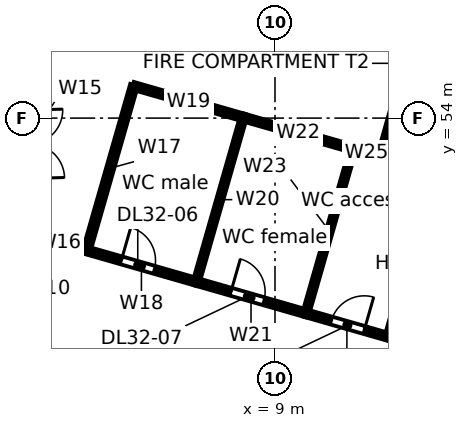
"""IFC4 building model, lengths in metres.
Left out: names, types, materials, properties, quantities, classifications, styles, units other than length and angle.
Written with IfcOpenShell. Run it as: python <this file> out.ifc"""

import sys

from ifc_helpers import new_model, si_unit, direction, frame, frame_2d, origin, place, context, subcontext, project, spatial, rectangle, extrude, element, fill, save


model = new_model("IFC4")
c1 = context("Model", 3, precision=1e-05, world=origin(), true_north=direction((0.0, 1.0)))
c2 = subcontext(c1, "Body", "Model", "MODEL_VIEW")
j1 = project(units=[si_unit("LENGTHUNIT", "METRE"), si_unit("PLANEANGLEUNIT", "RADIAN")], contexts=[c1])
p1 = place(None, origin())
s1 = spatial("IfcSite", under=j1, at=p1, CompositionType="ELEMENT")
p2 = place(p1, origin())
s2 = spatial("IfcBuilding", under=s1, at=p2, CompositionType="ELEMENT")
p3 = place(p2, frame((0.0, 0.0, 154.9)))
s3 = spatial("IfcBuildingStorey", under=s2, at=p3, CompositionType="ELEMENT", Elevation=154.9)
p4 = place(p3, frame((24.042, 41.106, 0.0), z_axis=(0.0, 0.0, 1.0), x_axis=(-0.961261693976, 0.275637362661, 0.0)))
e1 = element("IfcWall", 1, at=p4, inside=s3, PredefinedType="STANDARD", context=c2, shape_type="SweptSolid", body=[
    extrude(rectangle(XDim=24.948, YDim=0.3, at=frame_2d((12.474, 0.0))), origin(), (0.0, 0.0, 1.0), 3.68),
])
p5 = place(p4, frame((21.441, 0.0, 0.6)))
e2 = element("IfcOpeningElement", 2, at=p5, cuts=e1, PredefinedType="OPENING", context=c2, shape_type="SweptSolid", body=[
    extrude(rectangle(XDim=0.9, YDim=2.4, at=frame_2d((0.45, 1.2))), frame((0.0, 0.16, 0.0), z_axis=(0.0, -1.0, 0.0), x_axis=(1.0, 0.0, 0.0)), (0.0, 0.0, 1.0), 0.32),
])
p6 = place(p4, frame((13.121, 0.0, 0.6)))
e3 = element("IfcOpeningElement", 3, at=p6, cuts=e1, PredefinedType="OPENING", context=c2, shape_type="SweptSolid", body=[
    extrude(rectangle(XDim=0.9, YDim=2.4, at=frame_2d((0.45, 1.2))), frame((0.0, 0.16, 0.0), z_axis=(0.0, -1.0, 0.0), x_axis=(1.0, 0.0, 0.0)), (0.0, 0.0, 1.0), 0.32),
])
p7 = place(p4, frame((10.591, 0.0, 0.0)))
e4 = element("IfcOpeningElement", 4, at=p7, cuts=e1, PredefinedType="OPENING", context=c2, shape_type="SweptSolid", body=[
    extrude(rectangle(XDim=1.8, YDim=2.4, at=frame_2d((0.9, 1.2))), frame((0.0, 0.16, 0.0), z_axis=(0.0, -1.0, 0.0), x_axis=(1.0, 0.0, 0.0)), (0.0, 0.0, 1.0), 0.32),
])
p8 = place(p4, frame((4.8, 0.0, 0.6)))
e5 = element("IfcOpeningElement", 5, at=p8, cuts=e1, PredefinedType="OPENING", context=c2, shape_type="SweptSolid", body=[
    extrude(rectangle(XDim=0.9, YDim=2.4, at=frame_2d((0.45, 1.2))), frame((0.0, 0.16, 0.0), z_axis=(0.0, -1.0, 0.0), x_axis=(1.0, 0.0, 0.0)), (0.0, 0.0, 1.0), 0.32),
])
p9 = place(p4, frame((2.27, 0.0, 0.0)))
e6 = element("IfcOpeningElement", 6, at=p9, cuts=e1, PredefinedType="OPENING", context=c2, shape_type="SweptSolid", body=[
    extrude(rectangle(XDim=1.8, YDim=2.4, at=frame_2d((0.9, 1.2))), frame((0.0, 0.16, 0.0), z_axis=(0.0, -1.0, 0.0), x_axis=(1.0, 0.0, 0.0)), (0.0, 0.0, 1.0), 0.32),
])
p10 = place(p3, frame((2.601, 50.932, 0.0), z_axis=(0.0, 0.0, 1.0), x_axis=(0.961197773994, -0.27586018065, 0.0)))
e7 = element("IfcWall", 7, at=p10, inside=s3, PredefinedType="PARTITIONING", context=c2, shape_type="SweptSolid", body=[
    extrude(rectangle(XDim=1.5, YDim=0.125, at=frame_2d((0.75, 0.0))), origin(), (0.0, 0.0, 1.0), 3.68),
])
p11 = place(p3, frame((4.043, 50.518, 0.0), z_axis=(0.0, 0.0, 1.0), x_axis=(0.275745553681, 0.96123066411, 0.0)))
e8 = element("IfcWall", 8, at=p11, inside=s3, PredefinedType="PARTITIONING", context=c2, shape_type="SweptSolid", body=[
    extrude(rectangle(XDim=4.5, YDim=0.15, at=frame_2d((2.25, 0.0))), origin(), (0.0, 0.0, 1.0), 3.68),
])
p12 = place(p3, frame((4.043, 50.518, 0.0), z_axis=(0.0, 0.0, 1.0), x_axis=(0.961247103494, -0.275688240636, 0.0)))
e9 = element("IfcWall", 9, at=p12, inside=s3, PredefinedType="PARTITIONING", context=c2, shape_type="SweptSolid", body=[
    extrude(rectangle(XDim=3.0, YDim=0.15, at=frame_2d((1.5, 0.0))), origin(), (0.0, 0.0, 1.0), 3.68),
])
p13 = place(p12, frame((0.95, 0.0, 0.0)))
e10 = element("IfcOpeningElement", 10, at=p13, cuts=e9, PredefinedType="OPENING", context=c2, shape_type="SweptSolid", body=[
    extrude(rectangle(XDim=0.9, YDim=2.1, at=frame_2d((0.45, 1.05))), frame((0.0, 0.085, 0.0), z_axis=(0.0, -1.0, 0.0), x_axis=(1.0, 0.0, 0.0)), (0.0, 0.0, 1.0), 0.17),
])
p14 = place(p3, frame((5.284, 54.844, 0.0), z_axis=(0.0, 0.0, 1.0), x_axis=(0.961243927922, -0.275699312717, 0.0)))
e11 = element("IfcWall", 11, at=p14, inside=s3, PredefinedType="PARTITIONING", context=c2, shape_type="SweptSolid", body=[
    extrude(rectangle(XDim=2.999, YDim=0.15, at=frame_2d((1.5, 0.0))), origin(), (0.0, 0.0, 1.0), 3.68),
])
p15 = place(p3, frame((6.927, 49.691, 0.0), z_axis=(0.0, 0.0, 1.0), x_axis=(0.275530671241, 0.961292280841, 0.0)))
e12 = element("IfcWall", 12, at=p15, inside=s3, PredefinedType="PARTITIONING", context=c2, shape_type="SweptSolid", body=[
    extrude(rectangle(XDim=4.5, YDim=0.125, at=frame_2d((2.25, 0.0))), origin(), (0.0, 0.0, 1.0), 3.68),
])
p16 = place(p3, frame((6.927, 49.691, 0.0), z_axis=(0.0, 0.0, 1.0), x_axis=(0.961268664977, -0.27561305073, 0.0)))
e13 = element("IfcWall", 13, at=p16, inside=s3, PredefinedType="PARTITIONING", context=c2, shape_type="SweptSolid", body=[
    extrude(rectangle(XDim=3.0, YDim=0.15, at=frame_2d((1.5, 0.0))), origin(), (0.0, 0.0, 1.0), 2.748),
])
p17 = place(p16, frame((0.95, 0.0, 0.0)))
e14 = element("IfcOpeningElement", 14, at=p17, cuts=e13, PredefinedType="OPENING", context=c2, shape_type="SweptSolid", body=[
    extrude(rectangle(XDim=0.9, YDim=2.1, at=frame_2d((0.45, 1.05))), frame((0.0, 0.085, 0.0), z_axis=(0.0, -1.0, 0.0), x_axis=(1.0, 0.0, 0.0)), (0.0, 0.0, 1.0), 0.17),
])
p18 = place(p3, frame((8.167, 54.017, 0.0), z_axis=(0.0, 0.0, 1.0), x_axis=(0.961247103494, -0.275688240636, 0.0)))
e15 = element("IfcWall", 15, at=p18, inside=s3, PredefinedType="PARTITIONING", context=c2, shape_type="SweptSolid", body=[
    extrude(rectangle(XDim=3.0, YDim=0.15, at=frame_2d((1.5, 0.0))), origin(), (0.0, 0.0, 1.0), 2.748),
])
p19 = place(p3, frame((9.811, 48.864, 0.0), z_axis=(0.0, 0.0, 1.0), x_axis=(0.275545040649, 0.96128816209, 0.0)))
e16 = element("IfcWall", 16, at=p19, inside=s3, PredefinedType="PARTITIONING", context=c2, shape_type="SweptSolid", body=[
    extrude(rectangle(XDim=4.5, YDim=0.125, at=frame_2d((2.25, 0.0))), origin(), (0.0, 0.0, 1.0), 3.68),
])
p20 = place(p3, frame((9.811, 48.864, 0.0), z_axis=(0.0, 0.0, 1.0), x_axis=(0.961236680145, -0.275724581318, 0.0)))
e17 = element("IfcWall", 17, at=p20, inside=s3, PredefinedType="PARTITIONING", context=c2, shape_type="SweptSolid", body=[
    extrude(rectangle(XDim=2.249, YDim=0.15, at=frame_2d((1.125, 0.0))), origin(), (0.0, 0.0, 1.0), 3.68),
])
p21 = place(p20, frame((0.7, 0.0, 0.0)))
e18 = element("IfcOpeningElement", 18, at=p21, cuts=e17, PredefinedType="OPENING", context=c2, shape_type="SweptSolid", body=[
    extrude(rectangle(XDim=0.9, YDim=2.1, at=frame_2d((0.45, 1.05))), frame((0.0, 0.085, 0.0), z_axis=(0.0, -1.0, 0.0), x_axis=(1.0, 0.0, 0.0)), (0.0, 0.0, 1.0), 0.17),
])
p22 = place(p3, frame((11.051, 53.19, 0.0), z_axis=(0.0, 0.0, 1.0), x_axis=(0.961154610169, -0.276010534854, 0.0)))
e19 = element("IfcWall", 19, at=p22, inside=s3, PredefinedType="PARTITIONING", context=c2, shape_type="SweptSolid", body=[
    extrude(rectangle(XDim=0.75, YDim=0.15, at=frame_2d((0.375, 0.0))), origin(), (0.0, 0.0, 1.0), 3.68),
])
p23 = place(p3, frame((11.772, 52.983, 0.0), z_axis=(0.0, 0.0, 1.0), x_axis=(0.961382563126, -0.275215492508, 0.0)))
e20 = element("IfcWall", 20, at=p23, inside=s3, PredefinedType="PARTITIONING", context=c2, shape_type="SweptSolid", body=[
    extrude(rectangle(XDim=1.5, YDim=0.15, at=frame_2d((0.75, 0.0))), origin(), (0.0, 0.0, 1.0), 3.68),
])
p24 = place(p3, frame((11.772, 52.983, 0.0), z_axis=(0.0, 0.0, 1.0), x_axis=(0.272554241659, 0.96214041873, 0.0)))
e21 = element("IfcWall", 21, at=p24, inside=s3, PredefinedType="PARTITIONING", context=c2, shape_type="SweptSolid", body=[
    extrude(rectangle(XDim=14.885, YDim=0.125, at=frame_2d((7.443, 0.0))), origin(), (0.0, 0.0, 1.0), 2.748),
])
p25 = place(p3, frame((11.973, 48.244, 0.0), z_axis=(0.0, 0.0, 1.0), x_axis=(0.275781295989, 0.961220410095, 0.0)))
e22 = element("IfcWall", 22, at=p25, inside=s3, PredefinedType="PARTITIONING", context=c2, shape_type="SweptSolid", body=[
    extrude(rectangle(XDim=4.501, YDim=0.125, at=frame_2d((2.25, 0.0))), origin(), (0.0, 0.0, 1.0), 3.68),
])
p26 = place(p3, frame((11.973, 48.244, 0.0), z_axis=(0.0, 0.0, 1.0), x_axis=(0.96136592135, -0.275273618907, 0.0)))
e23 = element("IfcWall", 23, at=p26, inside=s3, PredefinedType="PARTITIONING", context=c2, shape_type="SweptSolid", body=[
    extrude(rectangle(XDim=1.751, YDim=0.125, at=frame_2d((0.875, 0.0))), origin(), (0.0, 0.0, 1.0), 3.68),
])
p27 = place(p26, frame((0.45, 0.0, 0.0)))
e24 = element("IfcOpeningElement", 24, at=p27, cuts=e23, PredefinedType="OPENING", context=c2, shape_type="SweptSolid", body=[
    extrude(rectangle(XDim=0.9, YDim=2.1, at=frame_2d((0.45, 1.05))), frame((0.0, 0.073, 0.0), z_axis=(0.0, -1.0, 0.0), x_axis=(1.0, 0.0, 0.0)), (0.0, 0.0, 1.0), 0.145),
])
p28 = place(p13, origin())
e25 = element("IfcDoor", 25, at=p28, inside=s3, OperationType="SINGLE_SWING_LEFT", PredefinedType="DOOR", context=c2, shape_type="SweptSolid", body=[
    extrude(rectangle(XDim=0.9, YDim=2.1, at=frame_2d((0.45, 1.05))), frame((0.0, 0.025, 0.0), z_axis=(0.0, -1.0, 0.0), x_axis=(1.0, 0.0, 0.0)), (0.0, 0.0, 1.0), 0.05),
])
fill(e10, e25)
p29 = place(p17, origin())
e26 = element("IfcDoor", 26, at=p29, inside=s3, OperationType="SINGLE_SWING_LEFT", PredefinedType="DOOR", context=c2, shape_type="SweptSolid", body=[
    extrude(rectangle(XDim=0.9, YDim=2.1, at=frame_2d((0.45, 1.05))), frame((0.0, 0.025, 0.0), z_axis=(0.0, -1.0, 0.0), x_axis=(1.0, 0.0, 0.0)), (0.0, 0.0, 1.0), 0.05),
])
fill(e14, e26)
p30 = place(p21, origin())
e27 = element("IfcDoor", 27, at=p30, inside=s3, OperationType="SINGLE_SWING_RIGHT", PredefinedType="DOOR", context=c2, shape_type="SweptSolid", body=[
    extrude(rectangle(XDim=0.9, YDim=2.1, at=frame_2d((0.45, 1.05))), frame((0.0, 0.025, 0.0), z_axis=(0.0, -1.0, 0.0), x_axis=(1.0, 0.0, 0.0)), (0.0, 0.0, 1.0), 0.05),
])
fill(e18, e27)
save(model, sys.argv[1])
